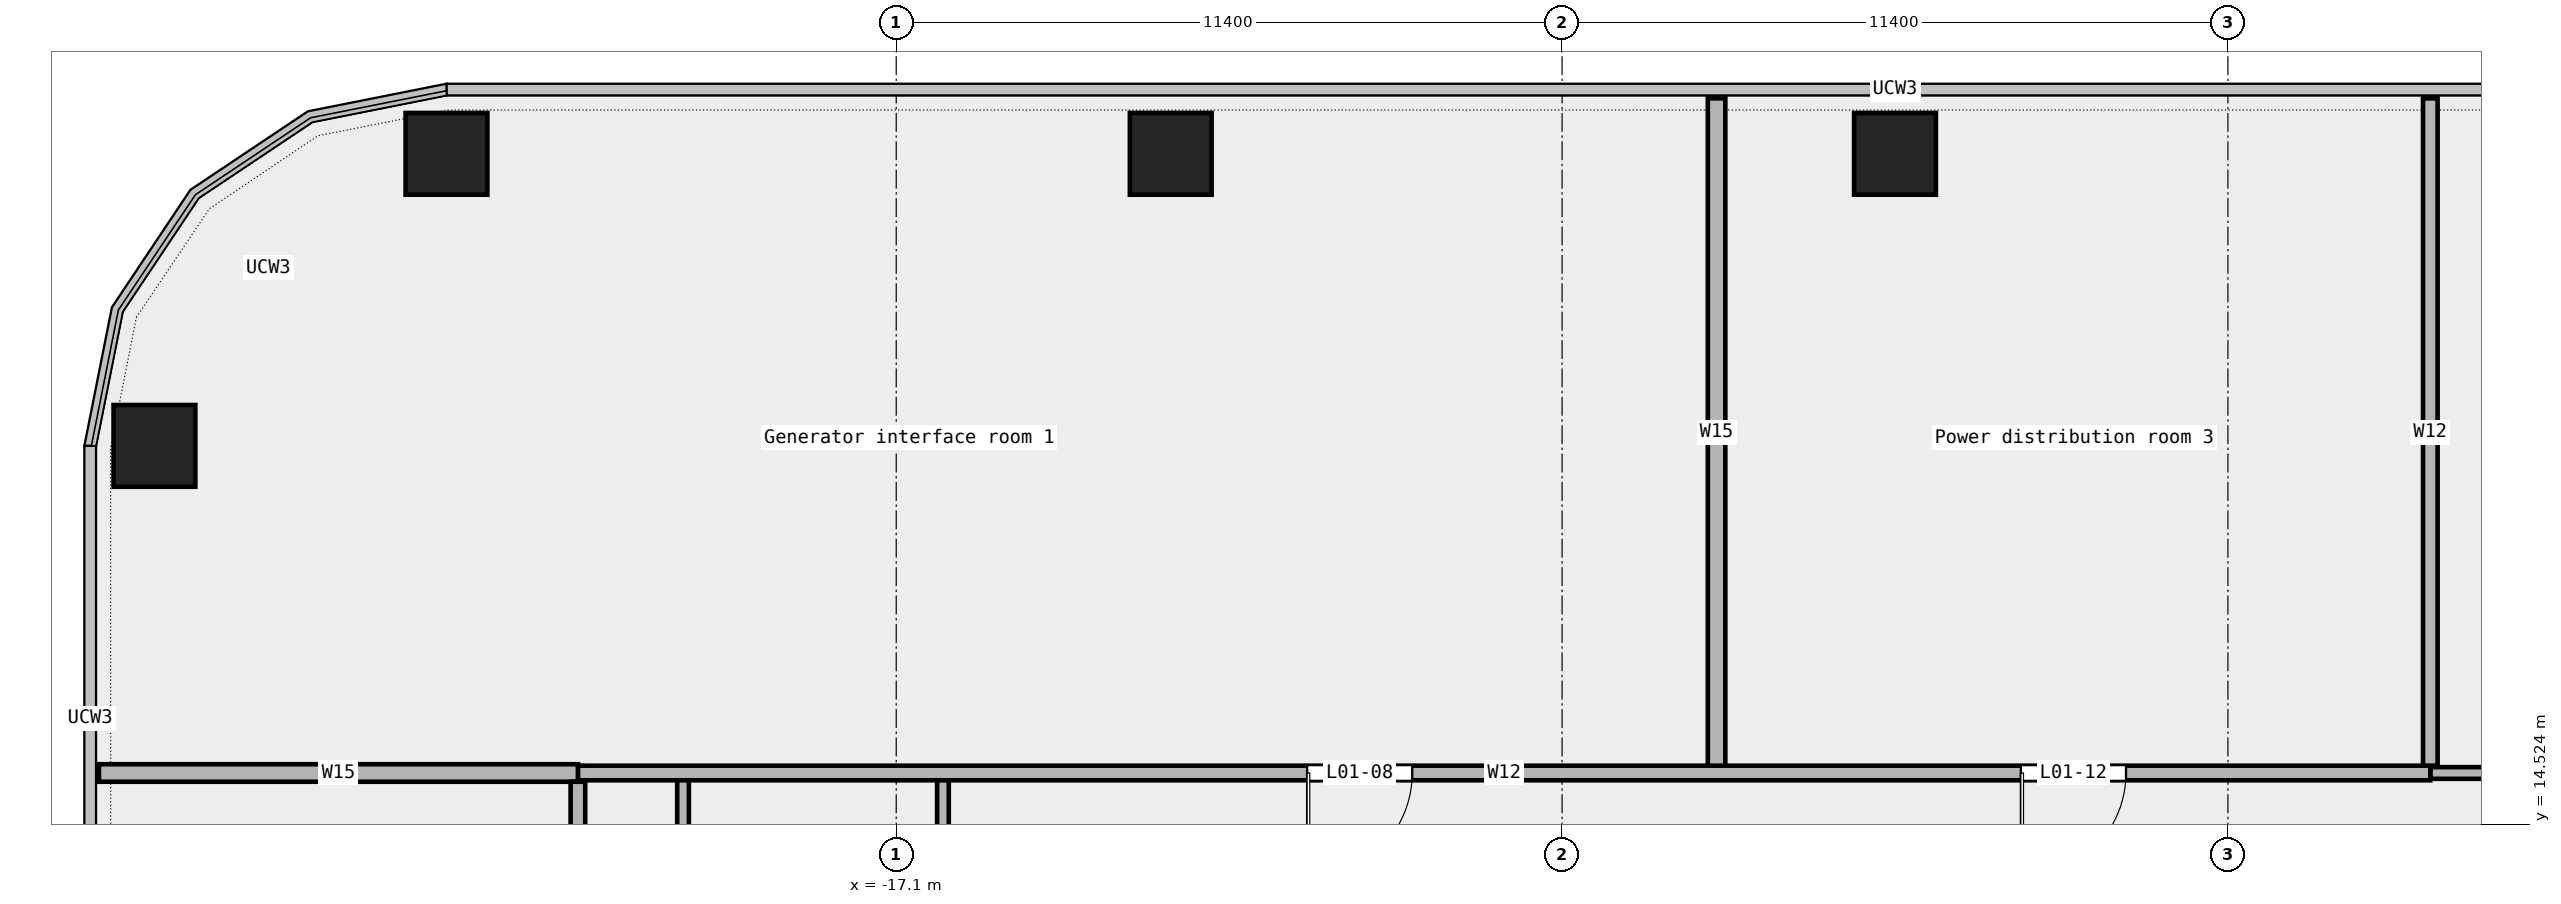
"""IFC4 building model, lengths in metres.
Left out: names, types, materials, properties, quantities, classifications, styles, units other than length and angle.
Written with IfcOpenShell. Run it as: python <this file> out.ifc"""

import sys

from ifc_helpers import new_model, si_unit, direction, frame, frame_2d, origin, origin_2d, place, context, subcontext, project, spatial, rectangle, extrude, element, fill, save


model = new_model("IFC4")
c1 = context("Model", 3, precision=1e-05, world=origin(), true_north=direction((0.0, 1.0)))
c2 = subcontext(c1, "Body", "Model", "MODEL_VIEW")
j1 = project(units=[si_unit("LENGTHUNIT", "METRE"), si_unit("PLANEANGLEUNIT", "RADIAN")], contexts=[c1])
p1 = place(None, origin())
s1 = spatial("IfcSite", under=j1, at=p1, CompositionType="ELEMENT")
p2 = place(p1, origin())
s2 = spatial("IfcBuilding", under=s1, at=p2, CompositionType="ELEMENT")
p3 = place(p2, frame((0.0, 0.0, 9.0)))
s3 = spatial("IfcBuildingStorey", under=s2, at=p3, CompositionType="ELEMENT", Elevation=9.0)
for number, where, z_axis, x_axis in (
    (1, (0.0, 26.0, 0.0), (0.0, 0.0, 1.0), (1.0, 0.0, 0.0)),
    (2, (-12.4, 26.0, 0.0), (0.0, 0.0, 1.0), (1.0, 0.0, 0.0)),
    (3, (-24.8, 26.0, 0.0), (0.0, 0.0, 1.0), (1.0, 0.0, 0.0)),
    (4, (-29.8, 21.0, 0.0), (0.0, 0.0, 1.0), (1.0, 0.0, 0.0)),
):
    element("IfcColumn", number, at=place(p3, frame(where, z_axis=z_axis, x_axis=x_axis)), inside=s3, PredefinedType="COLUMN", context=c2, shape_type="SweptSolid", body=[
        extrude(rectangle(XDim=1.4, YDim=1.4, at=origin_2d()), origin(), (0.0, 0.0, 1.0), 5.0),
    ])
p4 = place(p3, frame((9.165, 15.4, 0.0), z_axis=(0.0, 0.0, 1.0), x_axis=(1.0, 0.0, 0.0)))
e5 = element("IfcWall", 5, at=p4, inside=s3, PredefinedType="PARTITIONING", context=c2, shape_type="SweptSolid", body=[
    extrude(rectangle(XDim=7.135, YDim=0.2, at=frame_2d((3.567, 0.0))), origin(), (0.0, 0.0, 1.0), 5.0),
])
p5 = place(p4, frame((2.667, 0.0, 0.0)))
e6 = element("IfcOpeningElement", 6, at=p5, cuts=e5, PredefinedType="OPENING", context=c2, shape_type="SweptSolid", body=[
    extrude(rectangle(XDim=1.8, YDim=2.1, at=frame_2d((0.9, 1.05))), frame((0.0, 0.112, 0.0), z_axis=(0.0, -1.0, 0.0), x_axis=(1.0, 0.0, 0.0)), (0.0, 0.0, 1.0), 0.224),
])
p6 = place(p3, frame((-22.55, 15.4, 0.0), z_axis=(0.0, 0.0, 1.0), x_axis=(1.0, 0.0, 0.0)))
e7 = element("IfcWall", 7, at=p6, inside=s3, PredefinedType="PARTITIONING", context=c2, shape_type="SweptSolid", body=[
    extrude(rectangle(XDim=31.715, YDim=0.25, at=frame_2d((15.857, 0.0))), origin(), (0.0, 0.0, 1.0), 5.0),
])
p7 = place(p6, frame((12.485, 0.0, 0.0)))
e8 = element("IfcOpeningElement", 8, at=p7, cuts=e7, PredefinedType="OPENING", context=c2, shape_type="SweptSolid", body=[
    extrude(rectangle(XDim=1.8, YDim=2.1, at=frame_2d((0.9, 1.05))), frame((0.0, 0.137, 0.0), z_axis=(0.0, -1.0, 0.0), x_axis=(1.0, 0.0, 0.0)), (0.0, 0.0, 1.0), 0.274),
])
p8 = place(p6, frame((24.705, 0.0, 0.0)))
e9 = element("IfcOpeningElement", 9, at=p8, cuts=e7, PredefinedType="OPENING", context=c2, shape_type="SweptSolid", body=[
    extrude(rectangle(XDim=1.8, YDim=2.1, at=frame_2d((0.9, 1.05))), frame((0.0, 0.137, 0.0), z_axis=(0.0, -1.0, 0.0), x_axis=(1.0, 0.0, 0.0)), (0.0, 0.0, 1.0), 0.274),
])
p9 = place(p3, frame((-30.75, 15.4, 0.0), z_axis=(0.0, 0.0, 1.0), x_axis=(1.0, 0.0, 0.0)))
e10 = element("IfcWall", 10, at=p9, inside=s3, PredefinedType="PARTITIONING", context=c2, shape_type="SweptSolid", body=[
    extrude(rectangle(XDim=8.2, YDim=0.3, at=frame_2d((4.1, 0.0))), origin(), (0.0, 0.0, 1.0), 5.0),
])
p10 = place(p3, frame((-22.55, 11.79, 0.0), z_axis=(0.0, 0.0, 1.0), x_axis=(0.0, 1.0, 0.0)))
e11 = element("IfcWall", 11, at=p10, inside=s3, PredefinedType="PARTITIONING", context=c2, shape_type="SweptSolid", body=[
    extrude(rectangle(XDim=3.46, YDim=0.25, at=frame_2d((1.73, 0.0))), origin(), (0.0, 0.0, 1.0), 5.0),
])
p11 = place(p10, frame((1.28, 0.0, 0.0)))
e12 = element("IfcOpeningElement", 12, at=p11, cuts=e11, PredefinedType="OPENING", context=c2, shape_type="SweptSolid", body=[
    extrude(rectangle(XDim=0.9, YDim=2.1, at=frame_2d((0.45, 1.05))), frame((0.0, 0.137, 0.0), z_axis=(0.0, -1.0, 0.0), x_axis=(1.0, 0.0, 0.0)), (0.0, 0.0, 1.0), 0.274),
])
p12 = place(p3, frame((-20.75, 4.15, 0.0), z_axis=(0.0, 0.0, 1.0), x_axis=(0.0, 1.0, 0.0)))
e13 = element("IfcWall", 13, at=p12, inside=s3, PredefinedType="PARTITIONING", context=c2, shape_type="SweptSolid", body=[
    extrude(rectangle(XDim=11.125, YDim=0.2, at=frame_2d((5.562, 0.0))), origin(), (0.0, 0.0, 1.0), 5.0),
])
p13 = place(p3, frame((-16.3, 11.8, 0.0), z_axis=(0.0, 0.0, 1.0), x_axis=(0.0, 1.0, 0.0)))
e14 = element("IfcWall", 14, at=p13, inside=s3, PredefinedType="PARTITIONING", context=c2, shape_type="SweptSolid", body=[
    extrude(rectangle(XDim=3.475, YDim=0.2, at=frame_2d((1.737, 0.0))), origin(), (0.0, 0.0, 1.0), 5.0),
])
p14 = place(p13, frame((1.288, 0.0, 0.0)))
e15 = element("IfcOpeningElement", 15, at=p14, cuts=e14, PredefinedType="OPENING", context=c2, shape_type="SweptSolid", body=[
    extrude(rectangle(XDim=0.9, YDim=2.1, at=frame_2d((0.45, 1.05))), frame((0.0, 0.112, 0.0), z_axis=(0.0, -1.0, 0.0), x_axis=(1.0, 0.0, 0.0)), (0.0, 0.0, 1.0), 0.224),
])
p15 = place(p3, frame((-3.055, 15.525, 0.0), z_axis=(0.0, 0.0, 1.0), x_axis=(0.0, 1.0, 0.0)))
e16 = element("IfcWall", 16, at=p15, inside=s3, PredefinedType="PARTITIONING", context=c2, shape_type="SweptSolid", body=[
    extrude(rectangle(XDim=11.425, YDim=0.3, at=frame_2d((5.712, 0.0))), origin(), (0.0, 0.0, 1.0), 5.0),
])
p16 = place(p3, frame((9.165, 15.525, 0.0), z_axis=(0.0, 0.0, 1.0), x_axis=(0.0, 1.0, 0.0)))
e17 = element("IfcWall", 17, at=p16, inside=s3, PredefinedType="PARTITIONING", context=c2, shape_type="SweptSolid", body=[
    extrude(rectangle(XDim=11.425, YDim=0.25, at=frame_2d((5.712, 0.0))), origin(), (0.0, 0.0, 1.0), 5.0),
])
p17 = place(p7, origin())
e18 = element("IfcDoor", 18, at=p17, inside=s3, OperationType="DOUBLE_DOOR_SINGLE_SWING", PredefinedType="DOOR", context=c2, shape_type="SweptSolid", body=[
    extrude(rectangle(XDim=1.8, YDim=2.1, at=frame_2d((0.9, 1.05))), frame((0.0, 0.025, 0.0), z_axis=(0.0, -1.0, 0.0), x_axis=(1.0, 0.0, 0.0)), (0.0, 0.0, 1.0), 0.05),
])
fill(e8, e18)
p18 = place(p8, origin())
e19 = element("IfcDoor", 19, at=p18, inside=s3, OperationType="DOUBLE_DOOR_SINGLE_SWING", PredefinedType="DOOR", context=c2, shape_type="SweptSolid", body=[
    extrude(rectangle(XDim=1.8, YDim=2.1, at=frame_2d((0.9, 1.05))), frame((0.0, 0.025, 0.0), z_axis=(0.0, -1.0, 0.0), x_axis=(1.0, 0.0, 0.0)), (0.0, 0.0, 1.0), 0.05),
])
fill(e9, e19)
save(model, sys.argv[1])
